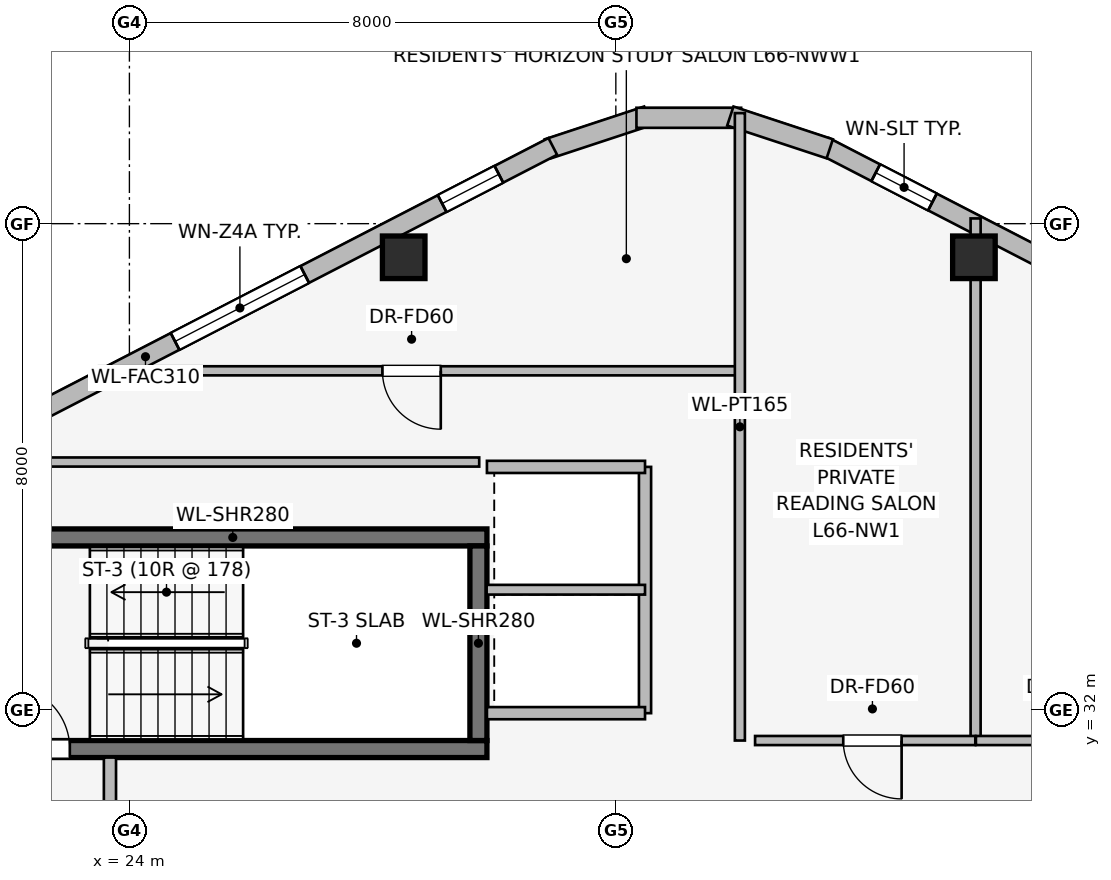
"""IFC4 building model, lengths in metres.
Left out: names, types, materials, properties, quantities, classifications, styles, units other than length and angle.
Written with IfcOpenShell. Run it as: python <this file> out.ifc"""

import sys

from ifc_helpers import new_model, si_unit, direction, frame, frame_2d, origin, origin_2d, place, context, subcontext, project, spatial, rectangle, extrude, element, fill, save


model = new_model("IFC4")
c1 = context("Model", 3, precision=1e-05, world=origin(), true_north=direction((0.0, 1.0)))
c2 = subcontext(c1, "Body", "Model", "MODEL_VIEW")
j1 = project(units=[si_unit("LENGTHUNIT", "METRE"), si_unit("PLANEANGLEUNIT", "RADIAN")], contexts=[c1])
p1 = place(None, origin())
s1 = spatial("IfcSite", under=j1, at=p1, CompositionType="ELEMENT")
p2 = place(p1, origin())
s2 = spatial("IfcBuilding", under=s1, at=p2, CompositionType="ELEMENT")
p3 = place(p2, frame((0.0, 0.0, 241.9)))
s3 = spatial("IfcBuildingStorey", under=s2, at=p3, CompositionType="ELEMENT", Elevation=241.9)
p4 = place(p3, frame((21.52, 31.36, 0.0), z_axis=(0.0, 0.0, 1.0), x_axis=(1.0, 0.0, 0.0)))
e1 = element("IfcWall", 1, at=p4, inside=s3, PredefinedType="SHEAR", context=c2, shape_type="SweptSolid", body=[
    extrude(rectangle(XDim=8.36, YDim=0.28, at=frame_2d((4.18, 0.0))), origin(), (0.0, 0.0, 1.0), 3.55),
])
p5 = place(p4, frame((0.45, 0.0, 0.0)))
e2 = element("IfcOpeningElement", 2, at=p5, cuts=e1, PredefinedType="OPENING", context=c2, shape_type="SweptSolid", body=[
    extrude(rectangle(XDim=1.05, YDim=2.0, at=frame_2d((0.525, 1.0))), frame((0.0, 0.15, 0.0), z_axis=(0.0, -1.0, 0.0), x_axis=(1.0, 0.0, 0.0)), (0.0, 0.0, 1.0), 0.3),
])
p6 = place(p3, frame((29.88, 34.84, 0.0), z_axis=(0.0, 0.0, 1.0), x_axis=(-1.0, 0.0, 0.0)))
e3 = element("IfcWall", 3, at=p6, inside=s3, PredefinedType="SHEAR", context=c2, shape_type="SweptSolid", body=[
    extrude(rectangle(XDim=8.36, YDim=0.28, at=frame_2d((4.18, 0.0))), origin(), (0.0, 0.0, 1.0), 3.55),
])
p7 = place(p3, frame((29.74, 31.5, 0.0), z_axis=(0.0, 0.0, 1.0), x_axis=(0.0, 1.0, 0.0)))
e4 = element("IfcWall", 4, at=p7, inside=s3, PredefinedType="SHEAR", context=c2, shape_type="SweptSolid", body=[
    extrude(rectangle(XDim=3.2, YDim=0.28, at=frame_2d((1.6, 0.0))), origin(), (0.0, 0.0, 1.0), 3.55),
])
for number, where, z_axis, x_axis in (
    (5, (37.889, 39.447, 0.0), (0.0, 0.0, 1.0), (1.0, 0.0, 0.0)),
    (6, (28.511, 39.447, 0.0), (0.0, 0.0, 1.0), (1.0, 0.0, 0.0)),
):
    element("IfcColumn", number, at=place(p3, frame(where, z_axis=z_axis, x_axis=x_axis)), inside=s3, PredefinedType="COLUMN", context=c2, shape_type="SweptSolid", body=[
        extrude(rectangle(XDim=0.7, YDim=0.7, at=origin_2d()), origin(), (0.0, 0.0, 1.0), 3.55),
    ])
p8 = place(p3, frame((35.437, 41.27, 0.0), z_axis=(0.0, 0.0, 1.0), x_axis=(0.888581481622, -0.458718814218, 0.0)))
e7 = element("IfcWall", 7, at=p8, inside=s3, PredefinedType="STANDARD", context=c2, shape_type="SweptSolid", body=[
    extrude(rectangle(XDim=15.077, YDim=0.31, at=frame_2d((7.539, 0.0))), origin(), (0.0, 0.0, 1.0), 3.29),
])
p9 = place(p8, frame((0.942, 0.0, 0.75)))
e8 = element("IfcOpeningElement", 8, at=p9, cuts=e7, PredefinedType="OPENING", context=c2, shape_type="SweptSolid", body=[
    extrude(rectangle(XDim=1.05, YDim=1.4, at=frame_2d((0.525, 0.7))), frame((0.0, 0.165, 0.0), z_axis=(0.0, -1.0, 0.0), x_axis=(1.0, 0.0, 0.0)), (0.0, 0.0, 1.0), 0.33),
])
p10 = place(p8, frame((4.344, 0.0, 0.75)))
e9 = element("IfcOpeningElement", 9, at=p10, cuts=e7, PredefinedType="OPENING", context=c2, shape_type="SweptSolid", body=[
    extrude(rectangle(XDim=1.05, YDim=1.4, at=frame_2d((0.525, 0.7))), frame((0.0, 0.165, 0.0), z_axis=(0.0, -1.0, 0.0), x_axis=(1.0, 0.0, 0.0)), (0.0, 0.0, 1.0), 0.33),
])
p11 = place(p8, frame((7.013, 0.0, 0.75)))
e10 = element("IfcOpeningElement", 10, at=p11, cuts=e7, PredefinedType="OPENING", context=c2, shape_type="SweptSolid", body=[
    extrude(rectangle(XDim=1.05, YDim=1.4, at=frame_2d((0.525, 0.7))), frame((0.0, 0.165, 0.0), z_axis=(0.0, -1.0, 0.0), x_axis=(1.0, 0.0, 0.0)), (0.0, 0.0, 1.0), 0.33),
])
p12 = place(p8, frame((9.681, 0.0, 0.75)))
e11 = element("IfcOpeningElement", 11, at=p12, cuts=e7, PredefinedType="OPENING", context=c2, shape_type="SweptSolid", body=[
    extrude(rectangle(XDim=1.05, YDim=1.4, at=frame_2d((0.525, 0.7))), frame((0.0, 0.165, 0.0), z_axis=(0.0, -1.0, 0.0), x_axis=(1.0, 0.0, 0.0)), (0.0, 0.0, 1.0), 0.33),
])
p13 = place(p8, frame((13.029, 0.0, 0.75)))
e12 = element("IfcOpeningElement", 12, at=p13, cuts=e7, PredefinedType="OPENING", context=c2, shape_type="SweptSolid", body=[
    extrude(rectangle(XDim=1.05, YDim=1.4, at=frame_2d((0.525, 0.7))), frame((0.0, 0.165, 0.0), z_axis=(0.0, -1.0, 0.0), x_axis=(1.0, 0.0, 0.0)), (0.0, 0.0, 1.0), 0.33),
])
p14 = place(p3, frame((30.882, 41.231, 0.0), z_axis=(0.0, 0.0, 1.0), x_axis=(0.949713440491, 0.313120393699, 0.0)))
e13 = element("IfcWall", 13, at=p14, inside=s3, PredefinedType="STANDARD", context=c2, shape_type="SweptSolid", body=[
    extrude(rectangle(XDim=1.722, YDim=0.33, at=frame_2d((0.861, 0.0))), origin(), (0.0, 0.0, 1.0), 3.29),
])
p15 = place(p3, frame((32.339, 41.741, 0.0), z_axis=(0.0, 0.0, 1.0), x_axis=(1.0, 0.0, 0.0)))
e14 = element("IfcWall", 14, at=p15, inside=s3, PredefinedType="STANDARD", context=c2, shape_type="SweptSolid", body=[
    extrude(rectangle(XDim=1.722, YDim=0.33, at=frame_2d((0.861, 0.0))), origin(), (0.0, 0.0, 1.0), 3.29),
])
p16 = place(p3, frame((33.883, 41.77, 0.0), z_axis=(0.0, 0.0, 1.0), x_axis=(0.949713440491, -0.313120393699, 0.0)))
e15 = element("IfcWall", 15, at=p16, inside=s3, PredefinedType="STANDARD", context=c2, shape_type="SweptSolid", body=[
    extrude(rectangle(XDim=1.722, YDim=0.33, at=frame_2d((0.861, 0.0))), origin(), (0.0, 0.0, 1.0), 3.29),
])
p17 = place(p3, frame((17.566, 34.354, 0.0), z_axis=(0.0, 0.0, 1.0), x_axis=(0.888581481622, 0.458718814218, 0.0)))
e16 = element("IfcWall", 16, at=p17, inside=s3, PredefinedType="STANDARD", context=c2, shape_type="SweptSolid", body=[
    extrude(rectangle(XDim=15.077, YDim=0.31, at=frame_2d((7.539, 0.0))), origin(), (0.0, 0.0, 1.0), 3.29),
])
p18 = place(p17, frame((0.998, 0.0, 0.75)))
e17 = element("IfcOpeningElement", 17, at=p18, cuts=e16, PredefinedType="OPENING", context=c2, shape_type="SweptSolid", body=[
    extrude(rectangle(XDim=1.05, YDim=1.4, at=frame_2d((0.525, 0.7))), frame((0.0, 0.165, 0.0), z_axis=(0.0, -1.0, 0.0), x_axis=(1.0, 0.0, 0.0)), (0.0, 0.0, 1.0), 0.33),
])
p19 = place(p17, frame((4.403, 0.0, 0.75)))
e18 = element("IfcOpeningElement", 18, at=p19, cuts=e16, PredefinedType="OPENING", context=c2, shape_type="SweptSolid", body=[
    extrude(rectangle(XDim=1.05, YDim=1.4, at=frame_2d((0.525, 0.7))), frame((0.0, 0.165, 0.0), z_axis=(0.0, -1.0, 0.0), x_axis=(1.0, 0.0, 0.0)), (0.0, 0.0, 1.0), 0.33),
])
p20 = place(p17, frame((8.086, 0.0, 0.75)))
e19 = element("IfcOpeningElement", 19, at=p20, cuts=e16, PredefinedType="OPENING", context=c2, shape_type="SweptSolid", body=[
    extrude(rectangle(XDim=2.4, YDim=1.6, at=frame_2d((1.2, 0.8))), frame((0.0, 0.165, 0.0), z_axis=(0.0, -1.0, 0.0), x_axis=(1.0, 0.0, 0.0)), (0.0, 0.0, 1.0), 0.33),
])
p21 = place(p17, frame((13.029, 0.0, 0.75)))
e20 = element("IfcOpeningElement", 20, at=p21, cuts=e16, PredefinedType="OPENING", context=c2, shape_type="SweptSolid", body=[
    extrude(rectangle(XDim=1.05, YDim=1.4, at=frame_2d((0.525, 0.7))), frame((0.0, 0.165, 0.0), z_axis=(0.0, -1.0, 0.0), x_axis=(1.0, 0.0, 0.0)), (0.0, 0.0, 1.0), 0.33),
])
p22 = place(p3, frame((23.68, 25.68, 0.0), z_axis=(0.0, 0.0, 1.0), x_axis=(0.0, 1.0, 0.0)))
e21 = element("IfcWall", 21, at=p22, inside=s3, PredefinedType="PARTITIONING", context=c2, shape_type="SweptSolid", body=[
    extrude(rectangle(XDim=5.54, YDim=0.2, at=frame_2d((2.77, 0.0))), origin(), (0.0, 0.0, 1.0), 3.29),
])
p23 = place(p22, frame((1.8, 0.0, 0.0)))
e22 = element("IfcOpeningElement", 22, at=p23, cuts=e21, PredefinedType="OPENING", context=c2, shape_type="SweptSolid", body=[
    extrude(rectangle(XDim=1.05, YDim=2.0, at=frame_2d((0.525, 1.0))), frame((0.0, 0.11, 0.0), z_axis=(0.0, -1.0, 0.0), x_axis=(1.0, 0.0, 0.0)), (0.0, 0.0, 1.0), 0.22),
])
p24 = place(p3, frame((32.48, 31.95, 0.0), z_axis=(0.0, 0.0, 1.0), x_axis=(0.0, 1.0, 0.0)))
e23 = element("IfcWall", 23, at=p24, inside=s3, PredefinedType="PARTITIONING", context=c2, shape_type="SweptSolid", body=[
    extrude(rectangle(XDim=4.05, YDim=0.2, at=frame_2d((2.025, 0.0))), origin(), (0.0, 0.0, 1.0), 3.29),
])
p25 = place(p3, frame((29.88, 36.0, 0.0), z_axis=(0.0, 0.0, 1.0), x_axis=(1.0, 0.0, 0.0)))
e24 = element("IfcWall", 24, at=p25, inside=s3, PredefinedType="PARTITIONING", context=c2, shape_type="SweptSolid", body=[
    extrude(rectangle(XDim=2.6, YDim=0.2, at=frame_2d((1.3, 0.0))), origin(), (0.0, 0.0, 1.0), 3.29),
])
p26 = place(p3, frame((32.48, 31.95, 0.0), z_axis=(0.0, 0.0, 1.0), x_axis=(-1.0, 0.0, 0.0)))
e25 = element("IfcWall", 25, at=p26, inside=s3, PredefinedType="PARTITIONING", context=c2, shape_type="SweptSolid", body=[
    extrude(rectangle(XDim=2.6, YDim=0.2, at=frame_2d((1.3, 0.0))), origin(), (0.0, 0.0, 1.0), 2.682),
])
p27 = place(p3, frame((29.875, 33.98, 0.0), z_axis=(0.0, 0.0, 1.0), x_axis=(1.0, 0.0, 0.0)))
e26 = element("IfcWall", 26, at=p27, inside=s3, PredefinedType="PARTITIONING", context=c2, shape_type="SweptSolid", body=[
    extrude(rectangle(XDim=2.605, YDim=0.16, at=frame_2d((1.302, 0.0))), origin(), (0.0, 0.0, 1.0), 3.29),
])
p28 = place(p3, frame((34.0, 37.58, 0.0), z_axis=(0.0, 0.0, 1.0), x_axis=(-1.0, 0.0, 0.0)))
e27 = element("IfcWall", 27, at=p28, inside=s3, PredefinedType="PARTITIONING", context=c2, shape_type="SweptSolid", body=[
    extrude(rectangle(XDim=10.501, YDim=0.15, at=frame_2d((5.25, 0.0))), origin(), (0.0, 0.0, 1.0), 3.29),
])
p29 = place(p28, frame((4.879, 0.0, 0.0)))
e28 = element("IfcOpeningElement", 28, at=p29, cuts=e27, PredefinedType="OPENING", context=c2, shape_type="SweptSolid", body=[
    extrude(rectangle(XDim=0.96, YDim=2.0, at=frame_2d((0.48, 1.0))), frame((0.0, 0.085, 0.0), z_axis=(0.0, -1.0, 0.0), x_axis=(1.0, 0.0, 0.0)), (0.0, 0.0, 1.0), 0.17),
])
p30 = place(p3, frame((34.04, 31.5, 0.0), z_axis=(0.0, 0.0, 1.0), x_axis=(0.0, 1.0, 0.0)))
e29 = element("IfcWall", 29, at=p30, inside=s3, PredefinedType="PARTITIONING", context=c2, shape_type="SweptSolid", body=[
    extrude(rectangle(XDim=10.318, YDim=0.165, at=frame_2d((5.159, 0.0))), origin(), (0.0, 0.0, 1.0), 3.29),
])
p31 = place(p3, frame((37.917, 31.51, 0.0), z_axis=(0.0, 0.0, 1.0), x_axis=(0.0, 1.0, 0.0)))
e30 = element("IfcWall", 30, at=p31, inside=s3, PredefinedType="PARTITIONING", context=c2, shape_type="SweptSolid", body=[
    extrude(rectangle(XDim=8.576, YDim=0.165, at=frame_2d((4.288, 0.0))), origin(), (0.0, 0.0, 1.0), 2.679),
])
p32 = place(p3, frame((37.912, 31.5, 0.0), z_axis=(0.0, 0.0, 1.0), x_axis=(-1.0, 0.0, 0.0)))
e31 = element("IfcWall", 31, at=p32, inside=s3, PredefinedType="PARTITIONING", context=c2, shape_type="SweptSolid", body=[
    extrude(rectangle(XDim=3.622, YDim=0.15, at=frame_2d((1.811, 0.0))), origin(), (0.0, 0.0, 1.0), 3.29),
])
p33 = place(p32, frame((1.212, 0.0, 0.0)))
e32 = element("IfcOpeningElement", 32, at=p33, cuts=e31, PredefinedType="OPENING", context=c2, shape_type="SweptSolid", body=[
    extrude(rectangle(XDim=0.96, YDim=2.0, at=frame_2d((0.48, 1.0))), frame((0.0, 0.085, 0.0), z_axis=(0.0, -1.0, 0.0), x_axis=(1.0, 0.0, 0.0)), (0.0, 0.0, 1.0), 0.17),
])
p34 = place(p3, frame((41.45, 31.5, 0.0), z_axis=(0.0, 0.0, 1.0), x_axis=(-1.0, 0.0, 0.0)))
e33 = element("IfcWall", 33, at=p34, inside=s3, PredefinedType="PARTITIONING", context=c2, shape_type="SweptSolid", body=[
    extrude(rectangle(XDim=3.528, YDim=0.15, at=frame_2d((1.764, 0.0))), origin(), (0.0, 0.0, 1.0), 3.29),
])
p35 = place(p34, frame((1.524, 0.0, 0.0)))
e34 = element("IfcOpeningElement", 34, at=p35, cuts=e33, PredefinedType="OPENING", context=c2, shape_type="SweptSolid", body=[
    extrude(rectangle(XDim=0.96, YDim=2.0, at=frame_2d((0.48, 1.0))), frame((0.0, 0.085, 0.0), z_axis=(0.0, -1.0, 0.0), x_axis=(1.0, 0.0, 0.0)), (0.0, 0.0, 1.0), 0.17),
])
p36 = place(p3, frame((29.753, 36.08, 0.0), z_axis=(0.0, 0.0, 1.0), x_axis=(-1.0, 0.0, 0.0)))
e35 = element("IfcWall", 35, at=p36, inside=s3, PredefinedType="PARTITIONING", context=c2, shape_type="SweptSolid", body=[
    extrude(rectangle(XDim=7.353, YDim=0.15, at=frame_2d((3.677, 0.0))), origin(), (0.0, 0.0, 1.0), 3.29),
])
p37 = place(p9, origin())
e36 = element("IfcWindow", 36, at=p37, inside=s3, PartitioningType="SINGLE_PANEL", PredefinedType="WINDOW", context=c2, shape_type="SweptSolid", body=[
    extrude(rectangle(XDim=1.05, YDim=1.4, at=frame_2d((0.525, 0.7))), frame((0.0, 0.03, 0.0), z_axis=(0.0, -1.0, 0.0), x_axis=(1.0, 0.0, 0.0)), (0.0, 0.0, 1.0), 0.06),
])
fill(e8, e36)
p38 = place(p20, origin())
e37 = element("IfcWindow", 37, at=p38, inside=s3, PartitioningType="SINGLE_PANEL", PredefinedType="WINDOW", context=c2, shape_type="SweptSolid", body=[
    extrude(rectangle(XDim=2.4, YDim=1.6, at=frame_2d((1.2, 0.8))), frame((0.0, 0.03, 0.0), z_axis=(0.0, -1.0, 0.0), x_axis=(1.0, 0.0, 0.0)), (0.0, 0.0, 1.0), 0.06),
])
fill(e19, e37)
p39 = place(p21, origin())
e38 = element("IfcWindow", 38, at=p39, inside=s3, PartitioningType="SINGLE_PANEL", PredefinedType="WINDOW", context=c2, shape_type="SweptSolid", body=[
    extrude(rectangle(XDim=1.05, YDim=1.4, at=frame_2d((0.525, 0.7))), frame((0.0, 0.03, 0.0), z_axis=(0.0, -1.0, 0.0), x_axis=(1.0, 0.0, 0.0)), (0.0, 0.0, 1.0), 0.06),
])
fill(e20, e38)
p40 = place(p5, origin())
e39 = element("IfcDoor", 39, at=p40, inside=s3, OperationType="SINGLE_SWING_LEFT", PredefinedType="DOOR", context=c2, shape_type="SweptSolid", body=[
    extrude(rectangle(XDim=1.05, YDim=2.0, at=frame_2d((0.525, 1.0))), frame((0.0, 0.025, 0.0), z_axis=(0.0, -1.0, 0.0), x_axis=(1.0, 0.0, 0.0)), (0.0, 0.0, 1.0), 0.05),
])
fill(e2, e39)
p41 = place(p29, origin())
e40 = element("IfcDoor", 40, at=p41, inside=s3, OperationType="SINGLE_SWING_LEFT", PredefinedType="DOOR", context=c2, shape_type="SweptSolid", body=[
    extrude(rectangle(XDim=0.96, YDim=2.0, at=frame_2d((0.48, 1.0))), frame((0.0, 0.025, 0.0), z_axis=(0.0, -1.0, 0.0), x_axis=(1.0, 0.0, 0.0)), (0.0, 0.0, 1.0), 0.05),
])
fill(e28, e40)
p42 = place(p33, origin())
e41 = element("IfcDoor", 41, at=p42, inside=s3, OperationType="SINGLE_SWING_LEFT", PredefinedType="DOOR", context=c2, shape_type="SweptSolid", body=[
    extrude(rectangle(XDim=0.96, YDim=2.0, at=frame_2d((0.48, 1.0))), frame((0.0, 0.025, 0.0), z_axis=(0.0, -1.0, 0.0), x_axis=(1.0, 0.0, 0.0)), (0.0, 0.0, 1.0), 0.05),
])
fill(e32, e41)
save(model, sys.argv[1])
